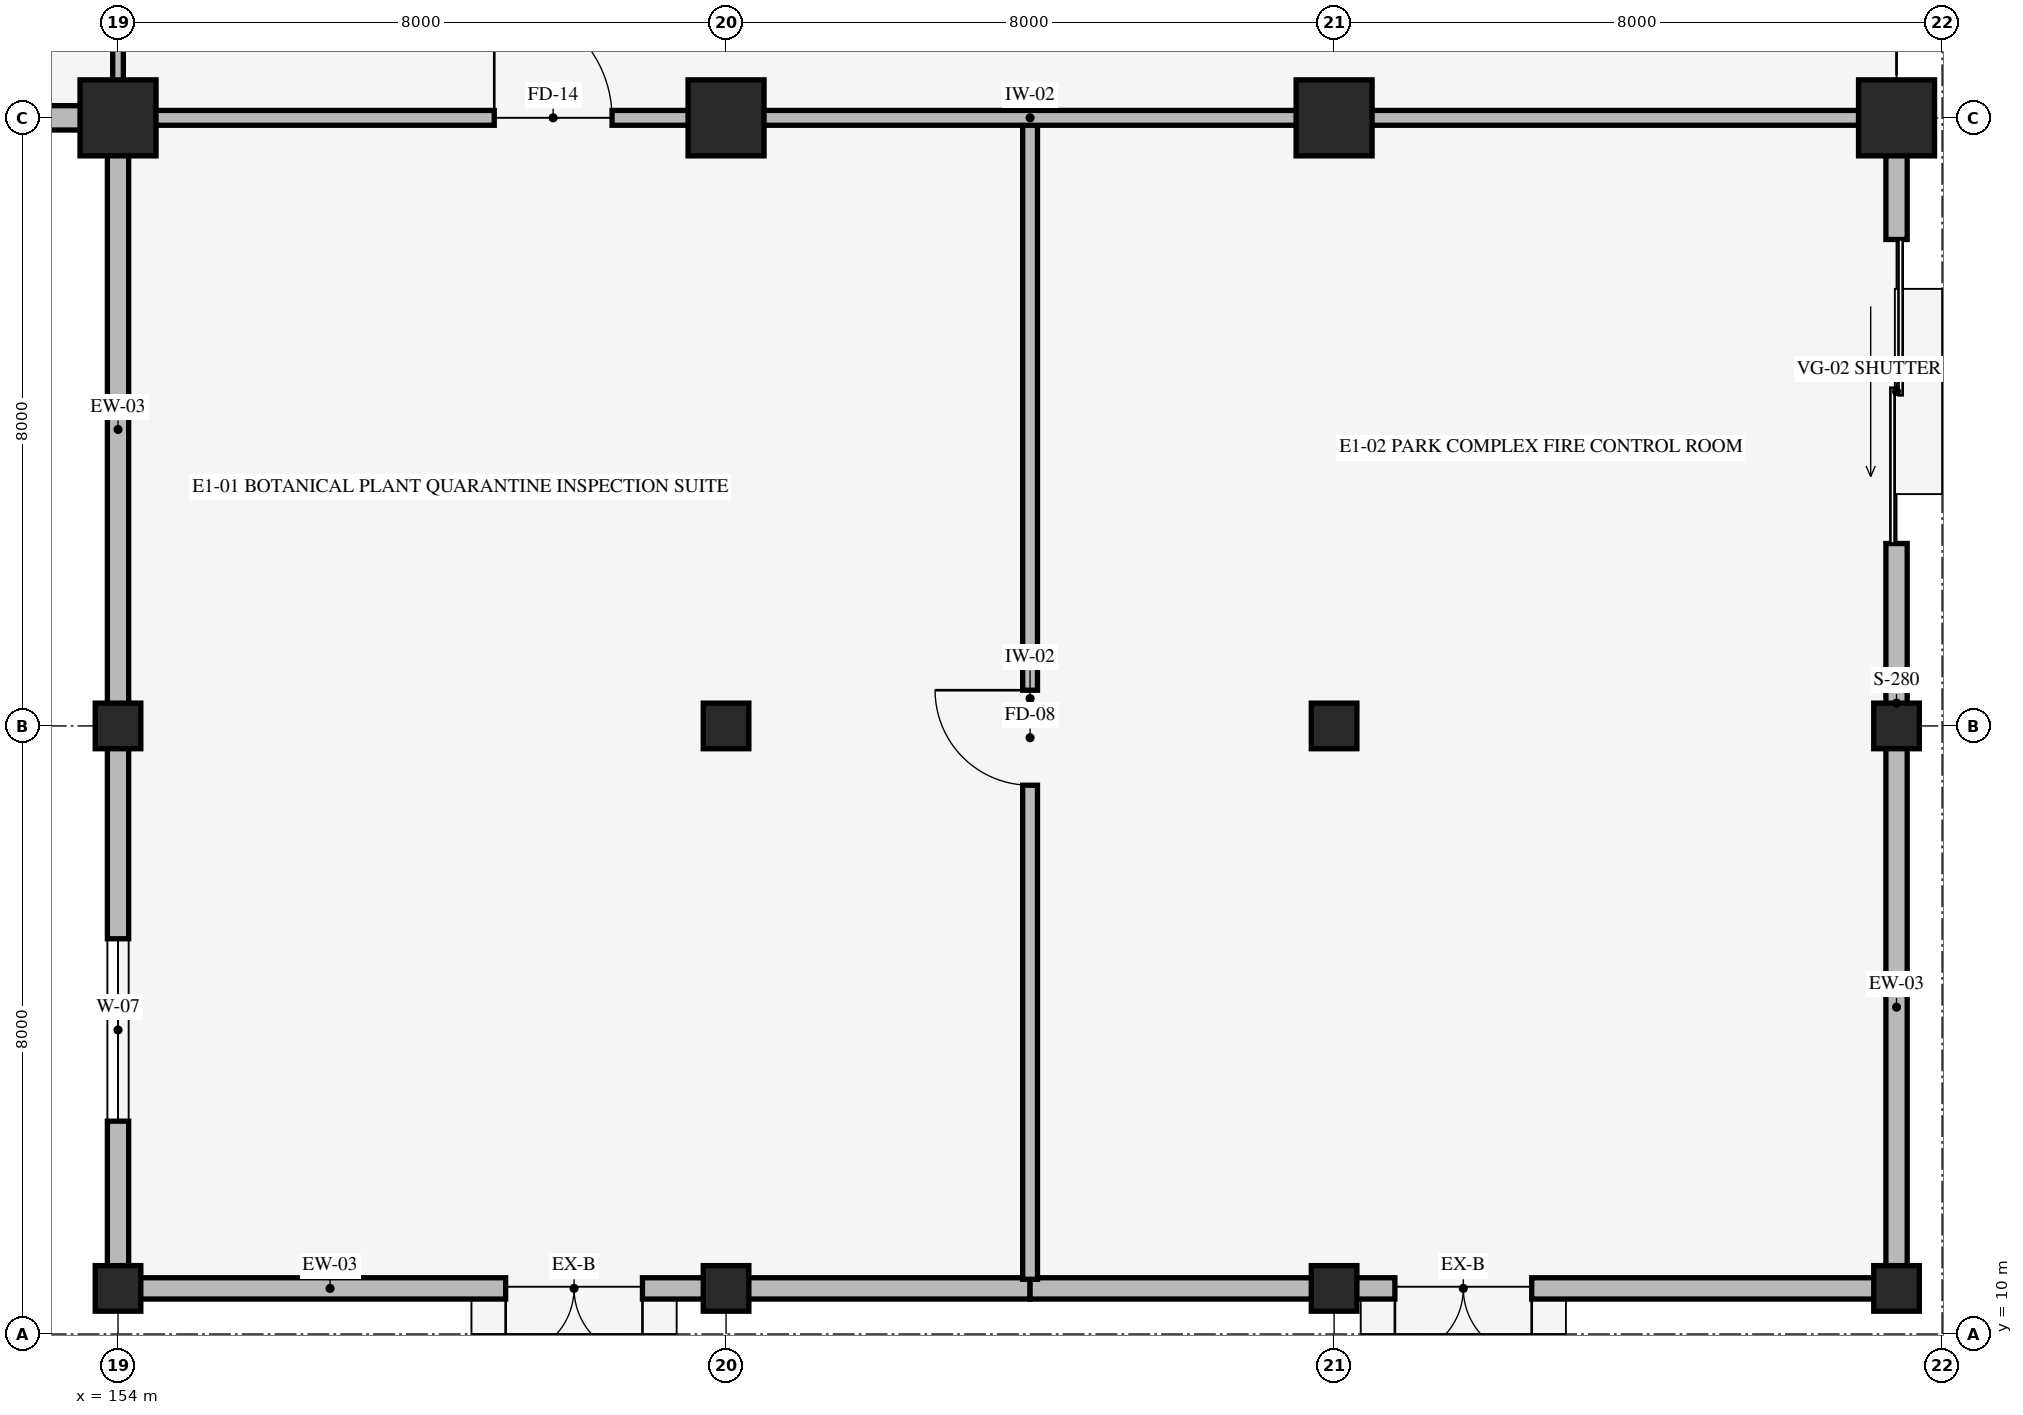
"""IFC4 building model, lengths in metres.
Left out: names, types, materials, properties, quantities, classifications, styles, units other than length and angle.
Written with IfcOpenShell. Run it as: python <this file> out.ifc"""

import sys

from ifc_helpers import new_model, si_unit, direction, frame, frame_2d, origin, origin_2d, place, context, subcontext, project, spatial, rectangle, extrude, element, fill, save


model = new_model("IFC4")
c1 = context("Model", 3, precision=1e-05, world=origin(), true_north=direction((0.0, 1.0)))
c2 = subcontext(c1, "Body", "Model", "MODEL_VIEW")
j1 = project(units=[si_unit("LENGTHUNIT", "METRE"), si_unit("PLANEANGLEUNIT", "RADIAN")], contexts=[c1])
p1 = place(None, origin())
s1 = spatial("IfcSite", under=j1, at=p1, CompositionType="ELEMENT")
p2 = place(p1, origin())
s2 = spatial("IfcBuilding", under=s1, at=p2, CompositionType="ELEMENT")
p3 = place(p2, origin())
s3 = spatial("IfcBuildingStorey", under=s2, at=p3, CompositionType="ELEMENT", Elevation=0.0)
for number, where, z_axis, x_axis in (
    (1, (154.0, 26.0, 0.0), (0.0, 0.0, 1.0), (1.0, 0.0, 0.0)),
    (2, (162.0, 26.0, 0.0), (0.0, 0.0, 1.0), (1.0, 0.0, 0.0)),
    (3, (170.0, 26.0, 0.0), (0.0, 0.0, 1.0), (1.0, 0.0, 0.0)),
    (4, (177.4, 26.0, 0.0), (0.0, 0.0, 1.0), (1.0, 0.0, 0.0)),
):
    element("IfcColumn", number, at=place(p3, frame(where, z_axis=z_axis, x_axis=x_axis)), inside=s3, PredefinedType="COLUMN", context=c2, shape_type="SweptSolid", body=[
        extrude(rectangle(XDim=1.0, YDim=1.0, at=origin_2d()), origin(), (0.0, 0.0, 1.0), 5.4),
    ])
p4 = place(p3, frame((154.0, 10.6, -0.28), z_axis=(0.0, 0.0, 1.0), x_axis=(1.0, 0.0, 0.0)))
e5 = element("IfcColumn", 5, at=p4, inside=s3, PredefinedType="COLUMN", context=c2, shape_type="SweptSolid", body=[
    extrude(rectangle(XDim=0.6, YDim=0.6, at=origin_2d()), origin(), (0.0, 0.0, 1.0), 5.95),
])
p5 = place(p3, frame((162.0, 10.6, -0.28), z_axis=(0.0, 0.0, 1.0), x_axis=(1.0, 0.0, 0.0)))
e6 = element("IfcColumn", 6, at=p5, inside=s3, PredefinedType="COLUMN", context=c2, shape_type="SweptSolid", body=[
    extrude(rectangle(XDim=0.6, YDim=0.6, at=origin_2d()), origin(), (0.0, 0.0, 1.0), 6.483),
])
p6 = place(p3, frame((170.0, 10.6, -0.28), z_axis=(0.0, 0.0, 1.0), x_axis=(1.0, 0.0, 0.0)))
e7 = element("IfcColumn", 7, at=p6, inside=s3, PredefinedType="COLUMN", context=c2, shape_type="SweptSolid", body=[
    extrude(rectangle(XDim=0.6, YDim=0.6, at=origin_2d()), origin(), (0.0, 0.0, 1.0), 7.017),
])
p7 = place(p3, frame((177.4, 10.6, -0.28), z_axis=(0.0, 0.0, 1.0), x_axis=(1.0, 0.0, 0.0)))
e8 = element("IfcColumn", 8, at=p7, inside=s3, PredefinedType="COLUMN", context=c2, shape_type="SweptSolid", body=[
    extrude(rectangle(XDim=0.6, YDim=0.6, at=origin_2d()), origin(), (0.0, 0.0, 1.0), 7.51),
])
p8 = place(p3, frame((154.0, 18.0, -0.28), z_axis=(0.0, 0.0, 1.0), x_axis=(1.0, 0.0, 0.0)))
e9 = element("IfcColumn", 9, at=p8, inside=s3, PredefinedType="COLUMN", context=c2, shape_type="SweptSolid", body=[
    extrude(rectangle(XDim=0.6, YDim=0.6, at=origin_2d()), origin(), (0.0, 0.0, 1.0), 5.95),
])
p9 = place(p3, frame((162.0, 18.0, -0.28), z_axis=(0.0, 0.0, 1.0), x_axis=(1.0, 0.0, 0.0)))
e10 = element("IfcColumn", 10, at=p9, inside=s3, PredefinedType="COLUMN", context=c2, shape_type="SweptSolid", body=[
    extrude(rectangle(XDim=0.6, YDim=0.6, at=origin_2d()), origin(), (0.0, 0.0, 1.0), 6.483),
])
p10 = place(p3, frame((170.0, 18.0, -0.28), z_axis=(0.0, 0.0, 1.0), x_axis=(1.0, 0.0, 0.0)))
e11 = element("IfcColumn", 11, at=p10, inside=s3, PredefinedType="COLUMN", context=c2, shape_type="SweptSolid", body=[
    extrude(rectangle(XDim=0.6, YDim=0.6, at=origin_2d()), origin(), (0.0, 0.0, 1.0), 7.017),
])
p11 = place(p3, frame((177.4, 18.0, -0.28), z_axis=(0.0, 0.0, 1.0), x_axis=(1.0, 0.0, 0.0)))
e12 = element("IfcColumn", 12, at=p11, inside=s3, PredefinedType="COLUMN", context=c2, shape_type="SweptSolid", body=[
    extrude(rectangle(XDim=0.6, YDim=0.6, at=origin_2d()), origin(), (0.0, 0.0, 1.0), 7.51),
])
p12 = place(p3, frame((154.0, 26.0, 0.0), z_axis=(0.0, 0.0, 1.0), x_axis=(-1.0, 0.0, 0.0)))
e13 = element("IfcWall", 13, at=p12, inside=s3, PredefinedType="STANDARD", context=c2, shape_type="SweptSolid", body=[
    extrude(rectangle(XDim=8.0, YDim=0.32, at=frame_2d((4.0, 0.0))), origin(), (0.0, 0.0, 1.0), 4.2),
])
p13 = place(p12, frame((3.0, 0.0, 0.0)))
e14 = element("IfcOpeningElement", 14, at=p13, cuts=e13, PredefinedType="OPENING", context=c2, shape_type="SweptSolid", body=[
    extrude(rectangle(XDim=2.0, YDim=2.4, at=frame_2d((1.0, 1.2))), frame((0.0, 0.17, 0.0), z_axis=(0.0, -1.0, 0.0), x_axis=(1.0, 0.0, 0.0)), (0.0, 0.0, 1.0), 0.34),
])
p14 = place(p3, frame((166.0, 10.6, 0.0), z_axis=(0.0, 0.0, 1.0), x_axis=(-1.0, 0.0, 0.0)))
e15 = element("IfcWall", 15, at=p14, inside=s3, PredefinedType="STANDARD", context=c2, shape_type="SweptSolid", body=[
    extrude(rectangle(XDim=12.0, YDim=0.28, at=frame_2d((6.0, 0.0))), origin(), (0.0, 0.0, 1.0), 5.7),
])
p15 = place(p14, frame((5.1, 0.0, 0.0)))
e16 = element("IfcOpeningElement", 16, at=p15, cuts=e15, PredefinedType="OPENING", context=c2, shape_type="SweptSolid", body=[
    extrude(rectangle(XDim=1.8, YDim=2.4, at=frame_2d((0.9, 1.2))), frame((0.0, 0.15, 0.0), z_axis=(0.0, -1.0, 0.0), x_axis=(1.0, 0.0, 0.0)), (0.0, 0.0, 1.0), 0.3),
])
p16 = place(p3, frame((177.4, 10.6, 0.0), z_axis=(0.0, 0.0, 1.0), x_axis=(-1.0, 0.0, 0.0)))
e17 = element("IfcWall", 17, at=p16, inside=s3, PredefinedType="STANDARD", context=c2, shape_type="SweptSolid", body=[
    extrude(rectangle(XDim=11.4, YDim=0.28, at=frame_2d((5.7, 0.0))), origin(), (0.0, 0.0, 1.0), 5.7),
])
p17 = place(p16, frame((4.8, 0.0, 0.0)))
e18 = element("IfcOpeningElement", 18, at=p17, cuts=e17, PredefinedType="OPENING", context=c2, shape_type="SweptSolid", body=[
    extrude(rectangle(XDim=1.8, YDim=2.4, at=frame_2d((0.9, 1.2))), frame((0.0, 0.15, 0.0), z_axis=(0.0, -1.0, 0.0), x_axis=(1.0, 0.0, 0.0)), (0.0, 0.0, 1.0), 0.3),
])
p18 = place(p3, frame((177.4, 26.0, 0.0), z_axis=(0.0, 0.0, 1.0), x_axis=(0.0, -1.0, 0.0)))
e19 = element("IfcWall", 19, at=p18, inside=s3, PredefinedType="STANDARD", context=c2, shape_type="SweptSolid", body=[
    extrude(rectangle(XDim=15.4, YDim=0.28, at=frame_2d((7.7, 0.0))), origin(), (0.0, 0.0, 1.0), 5.7),
])
p19 = place(p18, frame((1.6, 0.0, 0.0)))
e20 = element("IfcOpeningElement", 20, at=p19, cuts=e19, PredefinedType="OPENING", context=c2, shape_type="SweptSolid", body=[
    extrude(rectangle(XDim=4.0, YDim=3.2, at=frame_2d((2.0, 1.6))), frame((0.0, 0.15, 0.0), z_axis=(0.0, -1.0, 0.0), x_axis=(1.0, 0.0, 0.0)), (0.0, 0.0, 1.0), 0.3),
])
p20 = place(p3, frame((154.0, 10.6, 0.0), z_axis=(0.0, 0.0, 1.0), x_axis=(0.0, 1.0, 0.0)))
e21 = element("IfcWall", 21, at=p20, inside=s3, PredefinedType="STANDARD", context=c2, shape_type="SweptSolid", body=[
    extrude(rectangle(XDim=15.4, YDim=0.28, at=frame_2d((7.7, 0.0))), origin(), (0.0, 0.0, 1.0), 5.7),
])
p21 = place(p20, frame((2.2, 0.0, 0.9)))
e22 = element("IfcOpeningElement", 22, at=p21, cuts=e21, PredefinedType="OPENING", context=c2, shape_type="SweptSolid", body=[
    extrude(rectangle(XDim=2.4, YDim=1.8, at=frame_2d((1.2, 0.9))), frame((0.0, 0.15, 0.0), z_axis=(0.0, -1.0, 0.0), x_axis=(1.0, 0.0, 0.0)), (0.0, 0.0, 1.0), 0.3),
])
p22 = place(p3, frame((166.0, 10.72, 0.0), z_axis=(0.0, 0.0, 1.0), x_axis=(0.0, 1.0, 0.0)))
e23 = element("IfcWall", 23, at=p22, inside=s3, PredefinedType="STANDARD", context=c2, shape_type="SweptSolid", body=[
    extrude(rectangle(XDim=15.28, YDim=0.195, at=frame_2d((7.64, 0.0))), origin(), (0.0, 0.0, 1.0), 5.1),
])
p23 = place(p22, frame((6.5, 0.0, 0.0)))
e24 = element("IfcOpeningElement", 24, at=p23, cuts=e23, PredefinedType="OPENING", context=c2, shape_type="SweptSolid", body=[
    extrude(rectangle(XDim=1.25, YDim=2.15, at=frame_2d((0.625, 1.075))), frame((0.0, 0.107, 0.0), z_axis=(0.0, -1.0, 0.0), x_axis=(1.0, 0.0, 0.0)), (0.0, 0.0, 1.0), 0.215),
])
p24 = place(p3, frame((154.35, 26.0, 0.0), z_axis=(0.0, 0.0, 1.0), x_axis=(1.0, 0.0, 0.0)))
e25 = element("IfcWall", 25, at=p24, inside=s3, PredefinedType="STANDARD", context=c2, shape_type="SweptSolid", body=[
    extrude(rectangle(XDim=22.93, YDim=0.195, at=frame_2d((11.465, 0.0))), origin(), (0.0, 0.0, 1.0), 4.2),
])
p25 = place(p24, frame((4.6, 0.0, 0.0)))
e26 = element("IfcOpeningElement", 26, at=p25, cuts=e25, PredefinedType="OPENING", context=c2, shape_type="SweptSolid", body=[
    extrude(rectangle(XDim=1.55, YDim=2.25, at=frame_2d((0.775, 1.125))), frame((0.0, 0.107, 0.0), z_axis=(0.0, -1.0, 0.0), x_axis=(1.0, 0.0, 0.0)), (0.0, 0.0, 1.0), 0.215),
])
p26 = place(p3, frame((154.0, 26.05, 0.0), z_axis=(0.0, 0.0, 1.0), x_axis=(0.0, 1.0, 0.0)))
e27 = element("IfcWall", 27, at=p26, inside=s3, PredefinedType="STANDARD", context=c2, shape_type="SweptSolid", body=[
    extrude(rectangle(XDim=7.83, YDim=0.14, at=frame_2d((3.915, 0.0))), origin(), (0.0, 0.0, 1.0), 4.15),
])
p27 = place(p26, frame((3.0, 0.0, 0.0)))
e28 = element("IfcOpeningElement", 28, at=p27, cuts=e27, PredefinedType="OPENING", context=c2, shape_type="SweptSolid", body=[
    extrude(rectangle(XDim=1.06, YDim=2.12, at=frame_2d((0.53, 1.06))), frame((0.0, 0.08, 0.0), z_axis=(0.0, -1.0, 0.0), x_axis=(1.0, 0.0, 0.0)), (0.0, 0.0, 1.0), 0.16),
])
p28 = place(p15, origin())
e29 = element("IfcDoor", 29, at=p28, inside=s3, OperationType="DOUBLE_DOOR_SINGLE_SWING", PredefinedType="DOOR", context=c2, shape_type="SweptSolid", body=[
    extrude(rectangle(XDim=1.8, YDim=2.4, at=frame_2d((0.9, 1.2))), frame((0.0, 0.025, 0.0), z_axis=(0.0, -1.0, 0.0), x_axis=(1.0, 0.0, 0.0)), (0.0, 0.0, 1.0), 0.05),
])
fill(e16, e29)
p29 = place(p17, origin())
e30 = element("IfcDoor", 30, at=p29, inside=s3, OperationType="DOUBLE_DOOR_SINGLE_SWING", PredefinedType="DOOR", context=c2, shape_type="SweptSolid", body=[
    extrude(rectangle(XDim=1.8, YDim=2.4, at=frame_2d((0.9, 1.2))), frame((0.0, 0.025, 0.0), z_axis=(0.0, -1.0, 0.0), x_axis=(1.0, 0.0, 0.0)), (0.0, 0.0, 1.0), 0.05),
])
fill(e18, e30)
p30 = place(p19, origin())
e31 = element("IfcDoor", 31, at=p30, inside=s3, OperationType="ROLLINGUP", PredefinedType="GATE", context=c2, shape_type="SweptSolid", body=[
    extrude(rectangle(XDim=4.0, YDim=3.2, at=frame_2d((2.0, 1.6))), frame((0.0, 0.025, 0.0), z_axis=(0.0, -1.0, 0.0), x_axis=(1.0, 0.0, 0.0)), (0.0, 0.0, 1.0), 0.05),
])
fill(e20, e31)
p31 = place(p21, origin())
e32 = element("IfcWindow", 32, at=p31, inside=s3, PartitioningType="SINGLE_PANEL", PredefinedType="WINDOW", context=c2, shape_type="SweptSolid", body=[
    extrude(rectangle(XDim=2.4, YDim=1.8, at=frame_2d((1.2, 0.9))), frame((0.0, 0.03, 0.0), z_axis=(0.0, -1.0, 0.0), x_axis=(1.0, 0.0, 0.0)), (0.0, 0.0, 1.0), 0.06),
])
fill(e22, e32)
p32 = place(p23, origin())
e33 = element("IfcDoor", 33, at=p32, inside=s3, OperationType="SINGLE_SWING_RIGHT", PredefinedType="DOOR", context=c2, shape_type="SweptSolid", body=[
    extrude(rectangle(XDim=1.25, YDim=2.15, at=frame_2d((0.625, 1.075))), frame((0.0, 0.025, 0.0), z_axis=(0.0, -1.0, 0.0), x_axis=(1.0, 0.0, 0.0)), (0.0, 0.0, 1.0), 0.05),
])
fill(e24, e33)
p33 = place(p25, origin())
e34 = element("IfcDoor", 34, at=p33, inside=s3, OperationType="SINGLE_SWING_LEFT", PredefinedType="DOOR", context=c2, shape_type="SweptSolid", body=[
    extrude(rectangle(XDim=1.55, YDim=2.25, at=frame_2d((0.775, 1.125))), frame((0.0, 0.025, 0.0), z_axis=(0.0, -1.0, 0.0), x_axis=(1.0, 0.0, 0.0)), (0.0, 0.0, 1.0), 0.05),
])
fill(e26, e34)
save(model, sys.argv[1])
